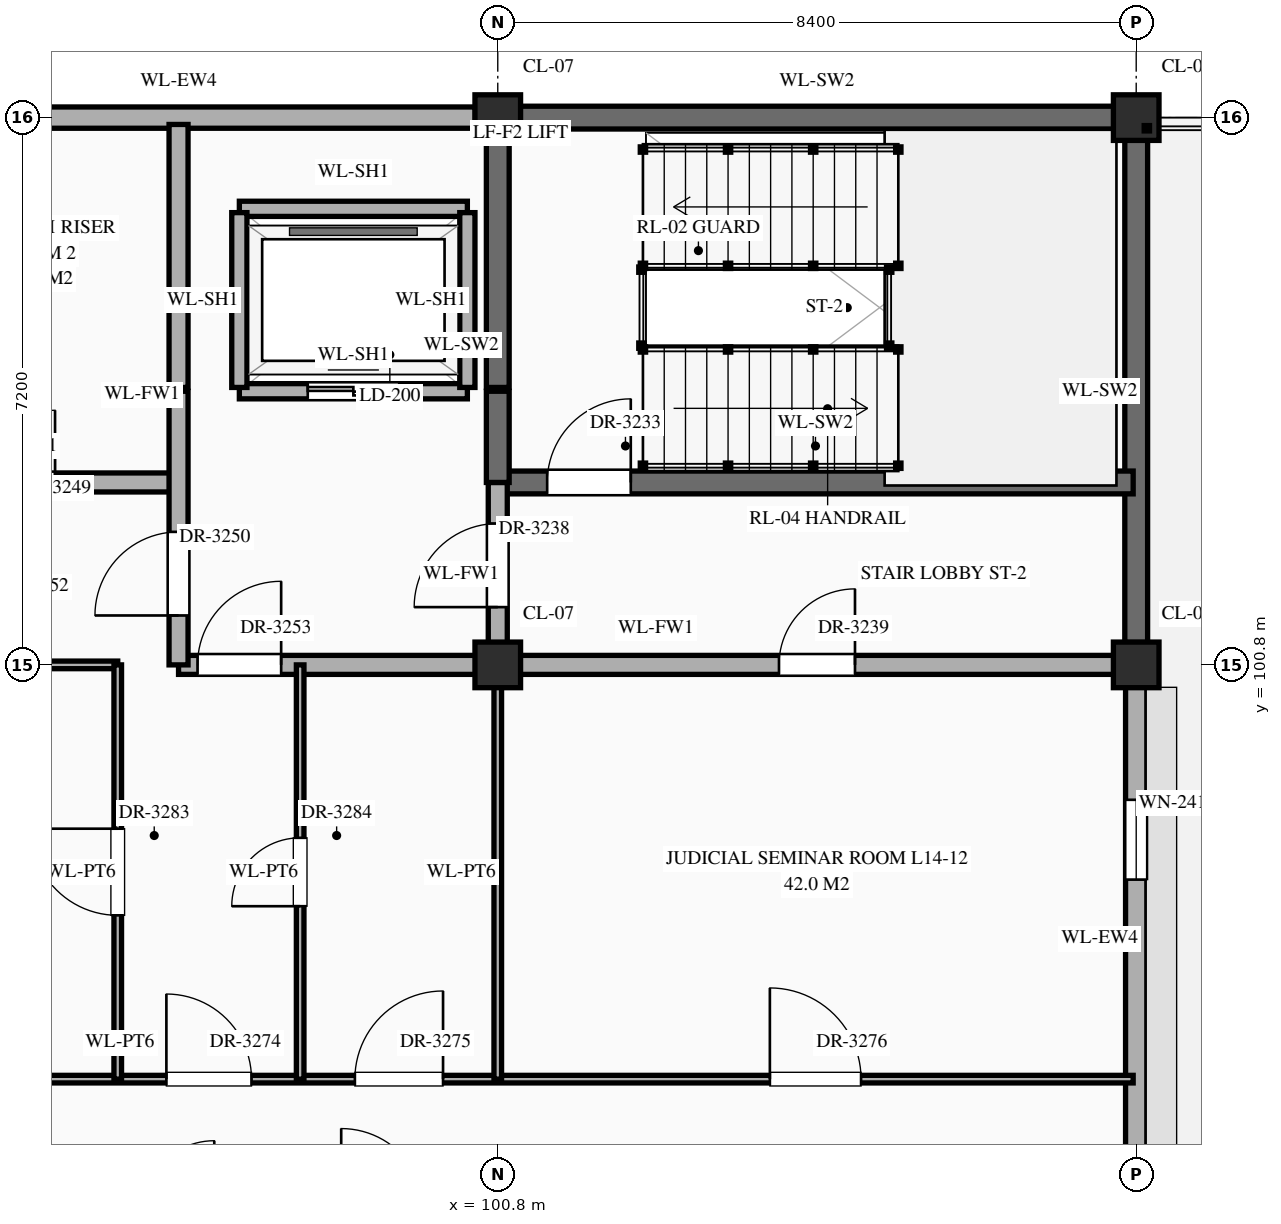
"""IFC4 building model, lengths in metres.
Left out: names, types, materials, properties, quantities, classifications, styles, units other than length and angle.
Written with IfcOpenShell. Run it as: python <this file> out.ifc"""

import sys

from ifc_helpers import new_model, si_unit, direction, frame, frame_2d, origin, origin_2d, place, context, subcontext, project, spatial, rectangle, extrude, element, fill, save


model = new_model("IFC4")
c1 = context("Model", 3, precision=1e-05, world=origin(), true_north=direction((0.0, 1.0)))
c2 = subcontext(c1, "Body", "Model", "MODEL_VIEW")
j1 = project(units=[si_unit("LENGTHUNIT", "METRE"), si_unit("PLANEANGLEUNIT", "RADIAN")], contexts=[c1])
p1 = place(None, origin())
s1 = spatial("IfcSite", under=j1, at=p1, CompositionType="ELEMENT")
p2 = place(p1, origin())
s2 = spatial("IfcBuilding", under=s1, at=p2, CompositionType="ELEMENT")
p3 = place(p2, frame((0.0, 0.0, 60.3)))
s3 = spatial("IfcBuildingStorey", under=s2, at=p3, CompositionType="ELEMENT", Elevation=60.3)
for number, where, z_axis, x_axis in (
    (1, (100.8, 100.8, 0.0), (0.0, 0.0, 1.0), (1.0, 0.0, 0.0)),
    (2, (100.8, 108.0, 0.0), (0.0, 0.0, 1.0), (1.0, 0.0, 0.0)),
    (3, (109.2, 100.8, 0.0), (0.0, 0.0, 1.0), (1.0, 0.0, 0.0)),
    (4, (109.2, 108.0, 0.0), (0.0, 0.0, 1.0), (1.0, 0.0, 0.0)),
):
    element("IfcColumn", number, at=place(p3, frame(where, z_axis=z_axis, x_axis=x_axis)), inside=s3, PredefinedType="COLUMN", context=c2, shape_type="SweptSolid", body=[
        extrude(rectangle(XDim=0.6, YDim=0.6, at=origin_2d()), origin(), (0.0, 0.0, 1.0), 4.2),
    ])
p4 = place(p3, frame((92.695, 108.0, 0.0), z_axis=(0.0, 0.0, 1.0), x_axis=(1.0, 0.0, 0.0)))
e5 = element("IfcWall", 5, at=p4, inside=s3, PredefinedType="STANDARD", context=c2, shape_type="SweptSolid", body=[
    extrude(rectangle(XDim=7.81, YDim=0.28, at=frame_2d((3.905, 0.0))), origin(), (0.0, 0.0, 1.0), 3.31),
])
p5 = place(p3, frame((109.2, 93.895, 0.0), z_axis=(0.0, 0.0, 1.0), x_axis=(0.0, 1.0, 0.0)))
e6 = element("IfcWall", 6, at=p5, inside=s3, PredefinedType="STANDARD", context=c2, shape_type="SweptSolid", body=[
    extrude(rectangle(XDim=6.61, YDim=0.28, at=frame_2d((3.305, 0.0))), origin(), (0.0, 0.0, 1.0), 3.31),
])
p6 = place(p5, frame((4.08, 0.0, 0.85)))
e7 = element("IfcOpeningElement", 7, at=p6, cuts=e6, PredefinedType="OPENING", context=c2, shape_type="SweptSolid", body=[
    extrude(rectangle(XDim=1.05, YDim=1.2, at=frame_2d((0.525, 0.6))), frame((0.0, 0.152, 0.0), z_axis=(0.0, -1.0, 0.0), x_axis=(1.0, 0.0, 0.0)), (0.0, 0.0, 1.0), 0.304),
])
p7 = place(p3, frame((101.095, 108.0, 0.0), z_axis=(0.0, 0.0, 1.0), x_axis=(1.0, 0.0, 0.0)))
e8 = element("IfcWall", 8, at=p7, inside=s3, PredefinedType="SHEAR", context=c2, shape_type="SweptSolid", body=[
    extrude(rectangle(XDim=7.81, YDim=0.3, at=frame_2d((3.905, 0.0))), origin(), (0.0, 0.0, 1.0), 3.96),
])
p8 = place(p3, frame((109.2, 101.095, 0.0), z_axis=(0.0, 0.0, 1.0), x_axis=(0.0, 1.0, 0.0)))
e9 = element("IfcWall", 9, at=p8, inside=s3, PredefinedType="SHEAR", context=c2, shape_type="SweptSolid", body=[
    extrude(rectangle(XDim=6.61, YDim=0.3, at=frame_2d((3.305, 0.0))), origin(), (0.0, 0.0, 1.0), 3.96),
])
p9 = place(p3, frame((58.84, 95.35, 0.0), z_axis=(0.0, 0.0, 1.0), x_axis=(1.0, 0.0, 0.0)))
e10 = element("IfcWall", 10, at=p9, inside=s3, PredefinedType="STANDARD", context=c2, shape_type="SweptSolid", body=[
    extrude(rectangle(XDim=50.32, YDim=0.1, at=frame_2d((25.16, 0.0))), origin(), (0.0, 0.0, 1.0), 3.96),
])
p10 = place(p9, frame((3.67, 0.0, 0.0)))
e11 = element("IfcOpeningElement", 11, at=p10, cuts=e10, PredefinedType="OPENING", context=c2, shape_type="SweptSolid", body=[
    extrude(rectangle(XDim=1.02, YDim=2.4, at=frame_2d((0.51, 1.2))), frame((0.0, 0.062, 0.0), z_axis=(0.0, -1.0, 0.0), x_axis=(1.0, 0.0, 0.0)), (0.0, 0.0, 1.0), 0.124),
])
p11 = place(p9, frame((9.53, 0.0, 0.0)))
e12 = element("IfcOpeningElement", 12, at=p11, cuts=e10, PredefinedType="OPENING", context=c2, shape_type="SweptSolid", body=[
    extrude(rectangle(XDim=1.06, YDim=2.4, at=frame_2d((0.53, 1.2))), frame((0.0, 0.062, 0.0), z_axis=(0.0, -1.0, 0.0), x_axis=(1.0, 0.0, 0.0)), (0.0, 0.0, 1.0), 0.124),
])
p12 = place(p9, frame((12.39, 0.0, 0.0)))
e13 = element("IfcOpeningElement", 13, at=p12, cuts=e10, PredefinedType="OPENING", context=c2, shape_type="SweptSolid", body=[
    extrude(rectangle(XDim=1.14, YDim=2.4, at=frame_2d((0.57, 1.2))), frame((0.0, 0.062, 0.0), z_axis=(0.0, -1.0, 0.0), x_axis=(1.0, 0.0, 0.0)), (0.0, 0.0, 1.0), 0.124),
])
p13 = place(p9, frame((15.01, 0.0, 0.0)))
e14 = element("IfcOpeningElement", 14, at=p13, cuts=e10, PredefinedType="OPENING", context=c2, shape_type="SweptSolid", body=[
    extrude(rectangle(XDim=0.9, YDim=2.15, at=frame_2d((0.45, 1.075))), frame((0.0, 0.062, 0.0), z_axis=(0.0, -1.0, 0.0), x_axis=(1.0, 0.0, 0.0)), (0.0, 0.0, 1.0), 0.124),
])
p14 = place(p9, frame((20.53, 0.0, 0.0)))
e15 = element("IfcOpeningElement", 15, at=p14, cuts=e10, PredefinedType="OPENING", context=c2, shape_type="SweptSolid", body=[
    extrude(rectangle(XDim=0.86, YDim=2.1, at=frame_2d((0.43, 1.05))), frame((0.0, 0.062, 0.0), z_axis=(0.0, -1.0, 0.0), x_axis=(1.0, 0.0, 0.0)), (0.0, 0.0, 1.0), 0.124),
])
p15 = place(p9, frame((28.84, 0.0, 0.0)))
e16 = element("IfcOpeningElement", 16, at=p15, cuts=e10, PredefinedType="OPENING", context=c2, shape_type="SweptSolid", body=[
    extrude(rectangle(XDim=1.04, YDim=2.2, at=frame_2d((0.52, 1.1))), frame((0.0, 0.062, 0.0), z_axis=(0.0, -1.0, 0.0), x_axis=(1.0, 0.0, 0.0)), (0.0, 0.0, 1.0), 0.124),
])
p16 = place(p9, frame((34.72, 0.0, 0.0)))
e17 = element("IfcOpeningElement", 17, at=p16, cuts=e10, PredefinedType="OPENING", context=c2, shape_type="SweptSolid", body=[
    extrude(rectangle(XDim=1.08, YDim=2.25, at=frame_2d((0.54, 1.125))), frame((0.0, 0.062, 0.0), z_axis=(0.0, -1.0, 0.0), x_axis=(1.0, 0.0, 0.0)), (0.0, 0.0, 1.0), 0.124),
])
p17 = place(p9, frame((37.6, 0.0, 0.0)))
e18 = element("IfcOpeningElement", 18, at=p17, cuts=e10, PredefinedType="OPENING", context=c2, shape_type="SweptSolid", body=[
    extrude(rectangle(XDim=1.12, YDim=2.25, at=frame_2d((0.56, 1.125))), frame((0.0, 0.062, 0.0), z_axis=(0.0, -1.0, 0.0), x_axis=(1.0, 0.0, 0.0)), (0.0, 0.0, 1.0), 0.124),
])
p18 = place(p9, frame((40.08, 0.0, 0.0)))
e19 = element("IfcOpeningElement", 19, at=p18, cuts=e10, PredefinedType="OPENING", context=c2, shape_type="SweptSolid", body=[
    extrude(rectangle(XDim=1.16, YDim=2.3, at=frame_2d((0.58, 1.15))), frame((0.0, 0.062, 0.0), z_axis=(0.0, -1.0, 0.0), x_axis=(1.0, 0.0, 0.0)), (0.0, 0.0, 1.0), 0.124),
])
p19 = place(p9, frame((45.54, 0.0, 0.0)))
e20 = element("IfcOpeningElement", 20, at=p19, cuts=e10, PredefinedType="OPENING", context=c2, shape_type="SweptSolid", body=[
    extrude(rectangle(XDim=1.2, YDim=2.35, at=frame_2d((0.6, 1.175))), frame((0.0, 0.062, 0.0), z_axis=(0.0, -1.0, 0.0), x_axis=(1.0, 0.0, 0.0)), (0.0, 0.0, 1.0), 0.124),
])
p20 = place(p3, frame((92.4, 100.8, 0.0), z_axis=(0.0, 0.0, 1.0), x_axis=(1.0, 0.0, 0.0)))
e21 = element("IfcWall", 21, at=p20, inside=s3, PredefinedType="STANDARD", context=c2, shape_type="SweptSolid", body=[
    extrude(rectangle(XDim=3.4, YDim=0.1, at=frame_2d((1.7, 0.0))), origin(), (0.0, 0.0, 1.0), 3.11),
])
p21 = place(p20, frame((1.35, 0.0, 0.0)))
e22 = element("IfcOpeningElement", 22, at=p21, cuts=e21, PredefinedType="OPENING", context=c2, shape_type="SweptSolid", body=[
    extrude(rectangle(XDim=0.92, YDim=2.15, at=frame_2d((0.46, 1.075))), frame((0.0, 0.062, 0.0), z_axis=(0.0, -1.0, 0.0), x_axis=(1.0, 0.0, 0.0)), (0.0, 0.0, 1.0), 0.124),
])
p22 = place(p3, frame((96.6, 100.8, 0.0), z_axis=(0.0, 0.0, 1.0), x_axis=(1.0, 0.0, 0.0)))
e23 = element("IfcWall", 23, at=p22, inside=s3, PredefinedType="STANDARD", context=c2, shape_type="SweptSolid", body=[
    extrude(rectangle(XDim=12.56, YDim=0.25, at=frame_2d((6.28, 0.0))), origin(), (0.0, 0.0, 1.0), 3.11),
])
p23 = place(p22, frame((7.9, 0.0, 0.0)))
e24 = element("IfcOpeningElement", 24, at=p23, cuts=e23, PredefinedType="OPENING", context=c2, shape_type="SweptSolid", body=[
    extrude(rectangle(XDim=1.0, YDim=2.2, at=frame_2d((0.5, 1.1))), frame((0.0, 0.137, 0.0), z_axis=(0.0, -1.0, 0.0), x_axis=(1.0, 0.0, 0.0)), (0.0, 0.0, 1.0), 0.274),
])
p24 = place(p22, frame((0.25, 0.0, 0.0)))
e25 = element("IfcOpeningElement", 25, at=p24, cuts=e23, PredefinedType="OPENING", context=c2, shape_type="SweptSolid", body=[
    extrude(rectangle(XDim=1.1, YDim=2.2, at=frame_2d((0.55, 1.1))), frame((0.0, 0.137, 0.0), z_axis=(0.0, -1.0, 0.0), x_axis=(1.0, 0.0, 0.0)), (0.0, 0.0, 1.0), 0.274),
])
p25 = place(p3, frame((92.4, 103.2, 0.0), z_axis=(0.0, 0.0, 1.0), x_axis=(1.0, 0.0, 0.0)))
e26 = element("IfcWall", 26, at=p25, inside=s3, PredefinedType="STANDARD", context=c2, shape_type="SweptSolid", body=[
    extrude(rectangle(XDim=4.2, YDim=0.25, at=frame_2d((2.1, 0.0))), origin(), (0.0, 0.0, 1.0), 3.96),
])
p26 = place(p25, frame((1.625, 0.0, 0.0)))
e27 = element("IfcOpeningElement", 27, at=p26, cuts=e26, PredefinedType="OPENING", context=c2, shape_type="SweptSolid", body=[
    extrude(rectangle(XDim=0.95, YDim=2.15, at=frame_2d((0.475, 1.075))), frame((0.0, 0.137, 0.0), z_axis=(0.0, -1.0, 0.0), x_axis=(1.0, 0.0, 0.0)), (0.0, 0.0, 1.0), 0.274),
])
p27 = place(p3, frame((100.8, 103.2, 0.0), z_axis=(0.0, 0.0, 1.0), x_axis=(1.0, 0.0, 0.0)))
e28 = element("IfcWall", 28, at=p27, inside=s3, PredefinedType="SHEAR", context=c2, shape_type="SweptSolid", body=[
    extrude(rectangle(XDim=8.36, YDim=0.3, at=frame_2d((4.18, 0.0))), origin(), (0.0, 0.0, 1.0), 3.96),
])
p28 = place(p27, frame((0.65, 0.0, 0.0)))
e29 = element("IfcOpeningElement", 29, at=p28, cuts=e28, PredefinedType="OPENING", context=c2, shape_type="SweptSolid", body=[
    extrude(rectangle(XDim=1.1, YDim=2.2, at=frame_2d((0.55, 1.1))), frame((0.0, 0.162, 0.0), z_axis=(0.0, -1.0, 0.0), x_axis=(1.0, 0.0, 0.0)), (0.0, 0.0, 1.0), 0.324),
])
p29 = place(p3, frame((97.4, 104.4, 0.0), z_axis=(0.0, 0.0, 1.0), x_axis=(1.0, 0.0, 0.0)))
e30 = element("IfcWall", 30, at=p29, inside=s3, PredefinedType="STANDARD", context=c2, shape_type="SweptSolid", body=[
    extrude(rectangle(XDim=3.0, YDim=0.2, at=frame_2d((1.5, 0.0))), origin(), (0.0, 0.0, 1.0), 3.96),
])
p30 = place(p29, frame((0.9, 0.0, 0.0)))
e31 = element("IfcOpeningElement", 31, at=p30, cuts=e30, PredefinedType="OPENING", context=c2, shape_type="SweptSolid", body=[
    extrude(rectangle(XDim=1.2, YDim=2.15, at=frame_2d((0.6, 1.075))), frame((0.0, 0.112, 0.0), z_axis=(0.0, -1.0, 0.0), x_axis=(1.0, 0.0, 0.0)), (0.0, 0.0, 1.0), 0.224),
])
p31 = place(p3, frame((97.4, 106.8, 0.0), z_axis=(0.0, 0.0, 1.0), x_axis=(1.0, 0.0, 0.0)))
e32 = element("IfcWall", 32, at=p31, inside=s3, PredefinedType="STANDARD", context=c2, shape_type="SweptSolid", body=[
    extrude(rectangle(XDim=3.0, YDim=0.2, at=frame_2d((1.5, 0.0))), origin(), (0.0, 0.0, 1.0), 3.96),
])
p32 = place(p3, frame((95.8, 95.35, 0.0), z_axis=(0.0, 0.0, 1.0), x_axis=(0.0, 1.0, 0.0)))
e33 = element("IfcWall", 33, at=p32, inside=s3, PredefinedType="STANDARD", context=c2, shape_type="SweptSolid", body=[
    extrude(rectangle(XDim=5.45, YDim=0.1, at=frame_2d((2.725, 0.0))), origin(), (0.0, 0.0, 1.0), 3.96),
])
p33 = place(p32, frame((2.155, 0.0, 0.0)))
e34 = element("IfcOpeningElement", 34, at=p33, cuts=e33, PredefinedType="OPENING", context=c2, shape_type="SweptSolid", body=[
    extrude(rectangle(XDim=1.14, YDim=2.4, at=frame_2d((0.57, 1.2))), frame((0.0, 0.062, 0.0), z_axis=(0.0, -1.0, 0.0), x_axis=(1.0, 0.0, 0.0)), (0.0, 0.0, 1.0), 0.124),
])
p34 = place(p3, frame((96.6, 100.8, 0.0), z_axis=(0.0, 0.0, 1.0), x_axis=(0.0, 1.0, 0.0)))
e35 = element("IfcWall", 35, at=p34, inside=s3, PredefinedType="STANDARD", context=c2, shape_type="SweptSolid", body=[
    extrude(rectangle(XDim=3.6, YDim=0.25, at=frame_2d((1.8, 0.0))), origin(), (0.0, 0.0, 1.0), 3.96),
])
p35 = place(p34, frame((0.65, 0.0, 0.0)))
e36 = element("IfcOpeningElement", 36, at=p35, cuts=e35, PredefinedType="OPENING", context=c2, shape_type="SweptSolid", body=[
    extrude(rectangle(XDim=1.1, YDim=2.2, at=frame_2d((0.55, 1.1))), frame((0.0, 0.137, 0.0), z_axis=(0.0, -1.0, 0.0), x_axis=(1.0, 0.0, 0.0)), (0.0, 0.0, 1.0), 0.274),
])
p36 = place(p3, frame((96.6, 104.45, 0.0), z_axis=(0.0, 0.0, 1.0), x_axis=(0.0, 1.0, 0.0)))
e37 = element("IfcWall", 37, at=p36, inside=s3, PredefinedType="STANDARD", context=c2, shape_type="SweptSolid", body=[
    extrude(rectangle(XDim=3.46, YDim=0.25, at=frame_2d((1.73, 0.0))), origin(), (0.0, 0.0, 1.0), 3.96),
])
p37 = place(p3, frame((97.4, 104.45, 0.0), z_axis=(0.0, 0.0, 1.0), x_axis=(0.0, 1.0, 0.0)))
e38 = element("IfcWall", 38, at=p37, inside=s3, PredefinedType="STANDARD", context=c2, shape_type="SweptSolid", body=[
    extrude(rectangle(XDim=2.3, YDim=0.2, at=frame_2d((1.15, 0.0))), origin(), (0.0, 0.0, 1.0), 3.96),
])
p38 = place(p3, frame((98.2, 95.35, 0.0), z_axis=(0.0, 0.0, 1.0), x_axis=(0.0, 1.0, 0.0)))
e39 = element("IfcWall", 39, at=p38, inside=s3, PredefinedType="STANDARD", context=c2, shape_type="SweptSolid", body=[
    extrude(rectangle(XDim=5.45, YDim=0.1, at=frame_2d((2.725, 0.0))), origin(), (0.0, 0.0, 1.0), 3.96),
])
p39 = place(p38, frame((2.275, 0.0, 0.0)))
e40 = element("IfcOpeningElement", 40, at=p39, cuts=e39, PredefinedType="OPENING", context=c2, shape_type="SweptSolid", body=[
    extrude(rectangle(XDim=0.9, YDim=2.15, at=frame_2d((0.45, 1.075))), frame((0.0, 0.062, 0.0), z_axis=(0.0, -1.0, 0.0), x_axis=(1.0, 0.0, 0.0)), (0.0, 0.0, 1.0), 0.124),
])
p40 = place(p3, frame((100.4, 104.45, 0.0), z_axis=(0.0, 0.0, 1.0), x_axis=(0.0, 1.0, 0.0)))
e41 = element("IfcWall", 41, at=p40, inside=s3, PredefinedType="STANDARD", context=c2, shape_type="SweptSolid", body=[
    extrude(rectangle(XDim=2.3, YDim=0.2, at=frame_2d((1.15, 0.0))), origin(), (0.0, 0.0, 1.0), 3.96),
])
p41 = place(p3, frame((100.8, 95.35, 0.0), z_axis=(0.0, 0.0, 1.0), x_axis=(0.0, 1.0, 0.0)))
e42 = element("IfcWall", 42, at=p41, inside=s3, PredefinedType="STANDARD", context=c2, shape_type="SweptSolid", body=[
    extrude(rectangle(XDim=5.45, YDim=0.1, at=frame_2d((2.725, 0.0))), origin(), (0.0, 0.0, 1.0), 3.21),
])
p42 = place(p3, frame((100.8, 100.8, 0.0), z_axis=(0.0, 0.0, 1.0), x_axis=(0.0, 1.0, 0.0)))
e43 = element("IfcWall", 43, at=p42, inside=s3, PredefinedType="STANDARD", context=c2, shape_type="SweptSolid", body=[
    extrude(rectangle(XDim=2.4, YDim=0.25, at=frame_2d((1.2, 0.0))), origin(), (0.0, 0.0, 1.0), 3.21),
])
p43 = place(p42, frame((0.76, 0.0, 0.0)))
e44 = element("IfcOpeningElement", 44, at=p43, cuts=e43, PredefinedType="OPENING", context=c2, shape_type="SweptSolid", body=[
    extrude(rectangle(XDim=1.1, YDim=2.2, at=frame_2d((0.55, 1.1))), frame((0.0, 0.137, 0.0), z_axis=(0.0, -1.0, 0.0), x_axis=(1.0, 0.0, 0.0)), (0.0, 0.0, 1.0), 0.274),
])
p44 = place(p3, frame((100.8, 103.2, 0.0), z_axis=(0.0, 0.0, 1.0), x_axis=(0.0, 1.0, 0.0)))
e45 = element("IfcWall", 45, at=p44, inside=s3, PredefinedType="SHEAR", context=c2, shape_type="SweptSolid", body=[
    extrude(rectangle(XDim=1.2, YDim=0.3, at=frame_2d((0.6, 0.0))), origin(), (0.0, 0.0, 1.0), 3.96),
])
p45 = place(p3, frame((100.8, 104.45, 0.0), z_axis=(0.0, 0.0, 1.0), x_axis=(0.0, 1.0, 0.0)))
e46 = element("IfcWall", 46, at=p45, inside=s3, PredefinedType="SHEAR", context=c2, shape_type="SweptSolid", body=[
    extrude(rectangle(XDim=3.46, YDim=0.3, at=frame_2d((1.73, 0.0))), origin(), (0.0, 0.0, 1.0), 3.96),
])
p46 = place(p6, origin())
e47 = element("IfcWindow", 47, at=p46, inside=s3, PartitioningType="SINGLE_PANEL", PredefinedType="WINDOW", context=c2, shape_type="SweptSolid", body=[
    extrude(rectangle(XDim=1.05, YDim=1.2, at=frame_2d((0.525, 0.6))), frame((0.0, 0.03, 0.0), z_axis=(0.0, -1.0, 0.0), x_axis=(1.0, 0.0, 0.0)), (0.0, 0.0, 1.0), 0.06),
])
fill(e7, e47)
p47 = place(p30, origin())
e48 = element("IfcDoor", 48, at=p47, inside=s3, OperationType="DOUBLE_DOOR_SLIDING", PredefinedType="DOOR", context=c2, shape_type="SweptSolid", body=[
    extrude(rectangle(XDim=1.2, YDim=2.15, at=frame_2d((0.6, 1.075))), frame((0.0, 0.025, 0.0), z_axis=(0.0, -1.0, 0.0), x_axis=(1.0, 0.0, 0.0)), (0.0, 0.0, 1.0), 0.05),
])
fill(e31, e48)
p48 = place(p28, origin())
e49 = element("IfcDoor", 49, at=p48, inside=s3, OperationType="SINGLE_SWING_RIGHT", PredefinedType="DOOR", context=c2, shape_type="SweptSolid", body=[
    extrude(rectangle(XDim=1.1, YDim=2.2, at=frame_2d((0.55, 1.1))), frame((0.0, 0.025, 0.0), z_axis=(0.0, -1.0, 0.0), x_axis=(1.0, 0.0, 0.0)), (0.0, 0.0, 1.0), 0.05),
])
fill(e29, e49)
p49 = place(p43, origin())
e50 = element("IfcDoor", 50, at=p49, inside=s3, OperationType="SINGLE_SWING_LEFT", PredefinedType="DOOR", context=c2, shape_type="SweptSolid", body=[
    extrude(rectangle(XDim=1.1, YDim=2.2, at=frame_2d((0.55, 1.1))), frame((0.0, 0.025, 0.0), z_axis=(0.0, -1.0, 0.0), x_axis=(1.0, 0.0, 0.0)), (0.0, 0.0, 1.0), 0.05),
])
fill(e44, e50)
p50 = place(p23, origin())
e51 = element("IfcDoor", 51, at=p50, inside=s3, OperationType="SINGLE_SWING_RIGHT", PredefinedType="DOOR", context=c2, shape_type="SweptSolid", body=[
    extrude(rectangle(XDim=1.0, YDim=2.2, at=frame_2d((0.5, 1.1))), frame((0.0, 0.025, 0.0), z_axis=(0.0, -1.0, 0.0), x_axis=(1.0, 0.0, 0.0)), (0.0, 0.0, 1.0), 0.05),
])
fill(e24, e51)
p51 = place(p26, origin())
e52 = element("IfcDoor", 52, at=p51, inside=s3, OperationType="SINGLE_SWING_RIGHT", PredefinedType="DOOR", context=c2, shape_type="SweptSolid", body=[
    extrude(rectangle(XDim=0.95, YDim=2.15, at=frame_2d((0.475, 1.075))), frame((0.0, 0.025, 0.0), z_axis=(0.0, -1.0, 0.0), x_axis=(1.0, 0.0, 0.0)), (0.0, 0.0, 1.0), 0.05),
])
fill(e27, e52)
p52 = place(p35, origin())
e53 = element("IfcDoor", 53, at=p52, inside=s3, OperationType="SINGLE_SWING_LEFT", PredefinedType="DOOR", context=c2, shape_type="SweptSolid", body=[
    extrude(rectangle(XDim=1.1, YDim=2.2, at=frame_2d((0.55, 1.1))), frame((0.0, 0.025, 0.0), z_axis=(0.0, -1.0, 0.0), x_axis=(1.0, 0.0, 0.0)), (0.0, 0.0, 1.0), 0.05),
])
fill(e36, e53)
p53 = place(p24, origin())
e54 = element("IfcDoor", 54, at=p53, inside=s3, OperationType="SINGLE_SWING_RIGHT", PredefinedType="DOOR", context=c2, shape_type="SweptSolid", body=[
    extrude(rectangle(XDim=1.1, YDim=2.2, at=frame_2d((0.55, 1.1))), frame((0.0, 0.025, 0.0), z_axis=(0.0, -1.0, 0.0), x_axis=(1.0, 0.0, 0.0)), (0.0, 0.0, 1.0), 0.05),
])
fill(e25, e54)
p54 = place(p17, origin())
e55 = element("IfcDoor", 55, at=p54, inside=s3, OperationType="SINGLE_SWING_LEFT", PredefinedType="DOOR", context=c2, shape_type="SweptSolid", body=[
    extrude(rectangle(XDim=1.12, YDim=2.25, at=frame_2d((0.56, 1.125))), frame((0.0, 0.025, 0.0), z_axis=(0.0, -1.0, 0.0), x_axis=(1.0, 0.0, 0.0)), (0.0, 0.0, 1.0), 0.05),
])
fill(e18, e55)
p55 = place(p18, origin())
e56 = element("IfcDoor", 56, at=p55, inside=s3, OperationType="SINGLE_SWING_RIGHT", PredefinedType="DOOR", context=c2, shape_type="SweptSolid", body=[
    extrude(rectangle(XDim=1.16, YDim=2.3, at=frame_2d((0.58, 1.15))), frame((0.0, 0.025, 0.0), z_axis=(0.0, -1.0, 0.0), x_axis=(1.0, 0.0, 0.0)), (0.0, 0.0, 1.0), 0.05),
])
fill(e19, e56)
p56 = place(p19, origin())
e57 = element("IfcDoor", 57, at=p56, inside=s3, OperationType="SINGLE_SWING_LEFT", PredefinedType="DOOR", context=c2, shape_type="SweptSolid", body=[
    extrude(rectangle(XDim=1.2, YDim=2.35, at=frame_2d((0.6, 1.175))), frame((0.0, 0.025, 0.0), z_axis=(0.0, -1.0, 0.0), x_axis=(1.0, 0.0, 0.0)), (0.0, 0.0, 1.0), 0.05),
])
fill(e20, e57)
p57 = place(p33, origin())
e58 = element("IfcDoor", 58, at=p57, inside=s3, OperationType="SINGLE_SWING_RIGHT", PredefinedType="DOOR", context=c2, shape_type="SweptSolid", body=[
    extrude(rectangle(XDim=1.14, YDim=2.4, at=frame_2d((0.57, 1.2))), frame((0.0, 0.025, 0.0), z_axis=(0.0, -1.0, 0.0), x_axis=(1.0, 0.0, 0.0)), (0.0, 0.0, 1.0), 0.05),
])
fill(e34, e58)
p58 = place(p39, origin())
e59 = element("IfcDoor", 59, at=p58, inside=s3, OperationType="SINGLE_SWING_LEFT", PredefinedType="DOOR", context=c2, shape_type="SweptSolid", body=[
    extrude(rectangle(XDim=0.9, YDim=2.15, at=frame_2d((0.45, 1.075))), frame((0.0, 0.025, 0.0), z_axis=(0.0, -1.0, 0.0), x_axis=(1.0, 0.0, 0.0)), (0.0, 0.0, 1.0), 0.05),
])
fill(e40, e59)
save(model, sys.argv[1])
